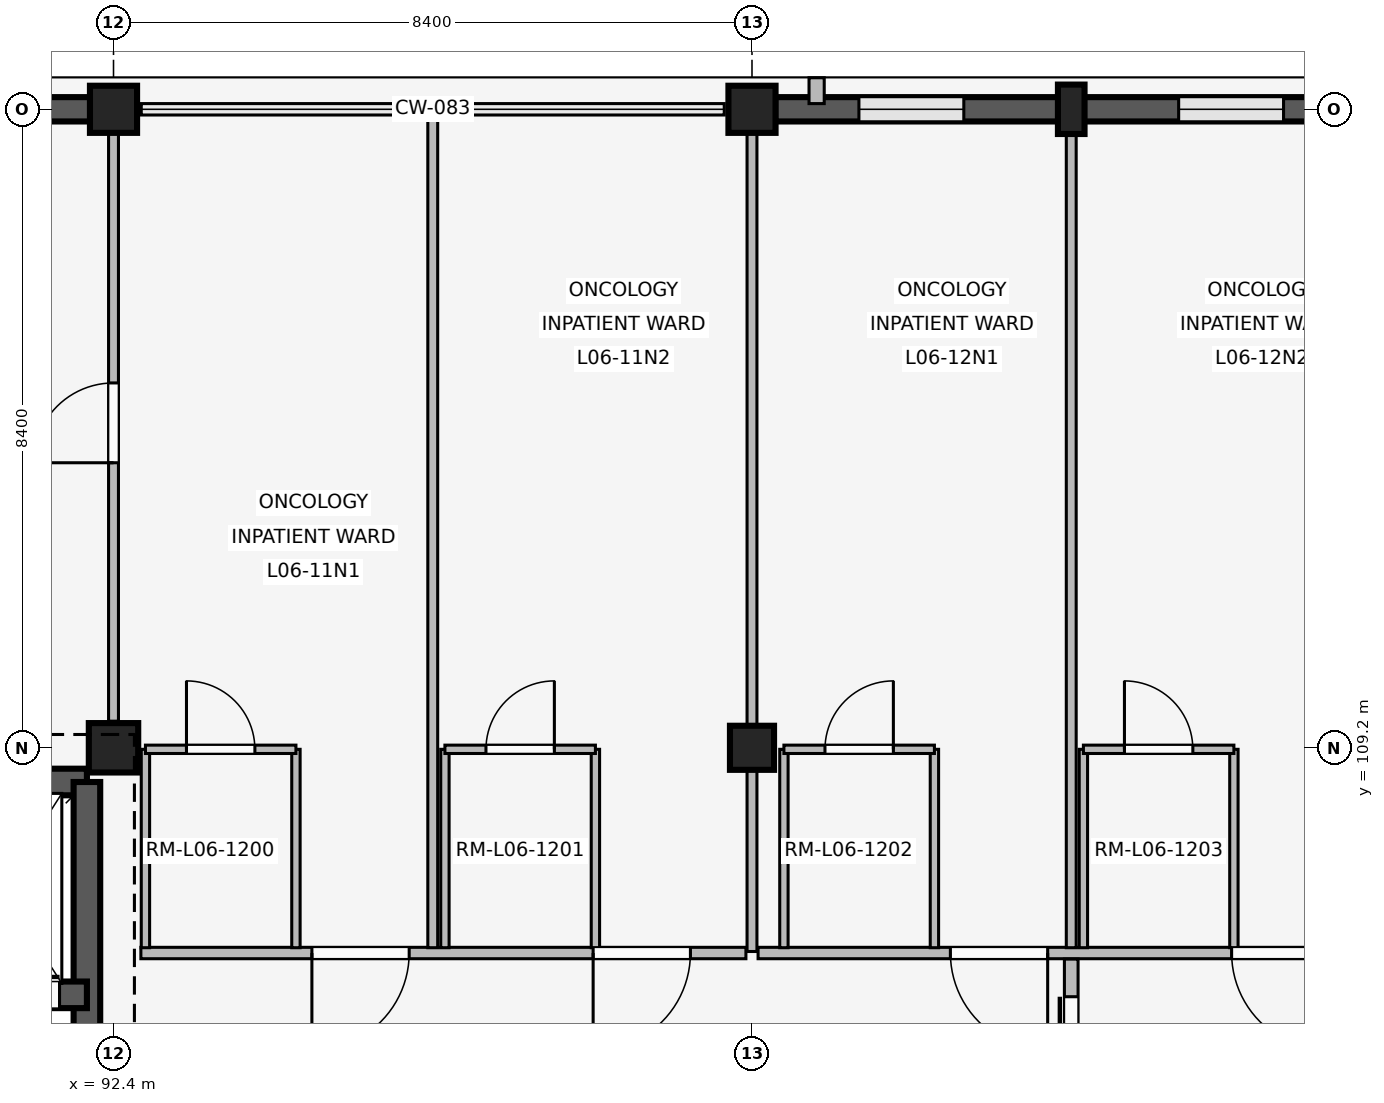
"""IFC4 building model, lengths in metres.
Left out: names, types, materials, properties, quantities, classifications, styles, units other than length and angle.
Written with IfcOpenShell. Run it as: python <this file> out.ifc"""

import sys

from ifc_helpers import new_model, si_unit, direction, frame, frame_2d, origin, origin_2d, place, context, subcontext, project, spatial, rectangle, extrude, element, fill, save


model = new_model("IFC4")
c1 = context("Model", 3, precision=1e-05, world=origin(), true_north=direction((0.0, 1.0)))
c2 = subcontext(c1, "Body", "Model", "MODEL_VIEW")
j1 = project(units=[si_unit("LENGTHUNIT", "METRE"), si_unit("PLANEANGLEUNIT", "RADIAN")], contexts=[c1])
p1 = place(None, origin())
s1 = spatial("IfcSite", under=j1, at=p1, CompositionType="ELEMENT")
p2 = place(p1, origin())
s2 = spatial("IfcBuilding", under=s1, at=p2, CompositionType="ELEMENT")
p3 = place(p2, frame((0.0, 0.0, 24.6)))
s3 = spatial("IfcBuildingStorey", under=s2, at=p3, CompositionType="ELEMENT", Elevation=24.6)
p4 = place(p3, frame((92.4, 109.2, 0.0), z_axis=(0.0, 0.0, 1.0), x_axis=(1.0, 0.0, 0.0)))
e1 = element("IfcColumn", 1, at=p4, inside=s3, PredefinedType="COLUMN", context=c2, shape_type="SweptSolid", body=[
    extrude(rectangle(XDim=0.65, YDim=0.65, at=origin_2d()), origin(), (0.0, 0.0, 1.0), 4.2),
])
p5 = place(p3, frame((92.4, 117.6, 0.0), z_axis=(0.0, 0.0, 1.0), x_axis=(1.0, 0.0, 0.0)))
e2 = element("IfcColumn", 2, at=p5, inside=s3, PredefinedType="COLUMN", context=c2, shape_type="SweptSolid", body=[
    extrude(rectangle(XDim=0.62, YDim=0.62, at=origin_2d()), origin(), (0.0, 0.0, 1.0), 4.2),
])
p6 = place(p3, frame((100.8, 109.2, 0.0), z_axis=(0.0, 0.0, 1.0), x_axis=(1.0, 0.0, 0.0)))
e3 = element("IfcColumn", 3, at=p6, inside=s3, PredefinedType="COLUMN", context=c2, shape_type="SweptSolid", body=[
    extrude(rectangle(XDim=0.58, YDim=0.58, at=origin_2d()), origin(), (0.0, 0.0, 1.0), 4.2),
])
p7 = place(p3, frame((100.8, 117.6, 0.0), z_axis=(0.0, 0.0, 1.0), x_axis=(1.0, 0.0, 0.0)))
e4 = element("IfcColumn", 4, at=p7, inside=s3, PredefinedType="COLUMN", context=c2, shape_type="SweptSolid", body=[
    extrude(rectangle(XDim=0.62, YDim=0.62, at=origin_2d()), origin(), (0.0, 0.0, 1.0), 4.2),
])
p8 = place(p3, frame((105.0, 117.6, 0.0), z_axis=(0.0, 0.0, 1.0), x_axis=(1.0, 0.0, 0.0)))
e5 = element("IfcColumn", 5, at=p8, inside=s3, PredefinedType="PILASTER", context=c2, shape_type="SweptSolid", body=[
    extrude(rectangle(XDim=0.35, YDim=0.65, at=origin_2d()), origin(), (0.0, 0.0, 1.0), 4.2),
])
p9 = place(p3, frame((84.305, 117.6, 0.0), z_axis=(0.0, 0.0, 1.0), x_axis=(1.0, 0.0, 0.0)))
e6 = element("IfcWall", 6, at=p9, inside=s3, PredefinedType="SOLIDWALL", context=c2, shape_type="SweptSolid", body=[
    extrude(rectangle(XDim=7.79, YDim=0.32, at=frame_2d((3.895, 0.0))), origin(), (0.0, 0.0, 1.0), 3.34),
])
p10 = place(p9, frame((1.022, 0.0, 0.85)))
e7 = element("IfcOpeningElement", 7, at=p10, cuts=e6, PredefinedType="OPENING", context=c2, shape_type="SweptSolid", body=[
    extrude(rectangle(XDim=1.54, YDim=1.85, at=frame_2d((0.77, 0.925))), frame((0.0, 0.17, 0.0), z_axis=(0.0, -1.0, 0.0), x_axis=(1.0, 0.0, 0.0)), (0.0, 0.0, 1.0), 0.34),
])
p11 = place(p9, frame((5.228, 0.0, 0.85)))
e8 = element("IfcOpeningElement", 8, at=p11, cuts=e6, PredefinedType="OPENING", context=c2, shape_type="SweptSolid", body=[
    extrude(rectangle(XDim=1.54, YDim=1.85, at=frame_2d((0.77, 0.925))), frame((0.0, 0.17, 0.0), z_axis=(0.0, -1.0, 0.0), x_axis=(1.0, 0.0, 0.0)), (0.0, 0.0, 1.0), 0.34),
])
p12 = place(p3, frame((101.105, 117.6, 0.0), z_axis=(0.0, 0.0, 1.0), x_axis=(1.0, 0.0, 0.0)))
e9 = element("IfcWall", 9, at=p12, inside=s3, PredefinedType="SOLIDWALL", context=c2, shape_type="SweptSolid", body=[
    extrude(rectangle(XDim=7.79, YDim=0.32, at=frame_2d((3.895, 0.0))), origin(), (0.0, 0.0, 1.0), 3.34),
])
p13 = place(p12, frame((1.102, 0.0, 0.85)))
e10 = element("IfcOpeningElement", 10, at=p13, cuts=e9, PredefinedType="OPENING", context=c2, shape_type="SweptSolid", body=[
    extrude(rectangle(XDim=1.38, YDim=1.5, at=frame_2d((0.69, 0.75))), frame((0.0, 0.17, 0.0), z_axis=(0.0, -1.0, 0.0), x_axis=(1.0, 0.0, 0.0)), (0.0, 0.0, 1.0), 0.34),
])
p14 = place(p12, frame((5.308, 0.0, 0.85)))
e11 = element("IfcOpeningElement", 11, at=p14, cuts=e9, PredefinedType="OPENING", context=c2, shape_type="SweptSolid", body=[
    extrude(rectangle(XDim=1.38, YDim=1.5, at=frame_2d((0.69, 0.75))), frame((0.0, 0.17, 0.0), z_axis=(0.0, -1.0, 0.0), x_axis=(1.0, 0.0, 0.0)), (0.0, 0.0, 1.0), 0.34),
])
p15 = place(p3, frame((101.65, 117.675, 0.0), z_axis=(0.0, 0.0, 1.0), x_axis=(0.0, 1.0, 0.0)))
e12 = element("IfcWall", 12, at=p15, inside=s3, PredefinedType="ELEMENTEDWALL", context=c2, shape_type="SweptSolid", body=[
    extrude(rectangle(XDim=0.34, YDim=0.2, at=frame_2d((0.17, 0.0))), origin(), (0.0, 0.0, 1.0), 3.32),
])
p16 = place(p3, frame((84.55, 108.75, 0.0), z_axis=(0.0, 0.0, 1.0), x_axis=(1.0, 0.0, 0.0)))
e13 = element("IfcWall", 13, at=p16, inside=s3, PredefinedType="SHEAR", context=c2, shape_type="SweptSolid", body=[
    extrude(rectangle(XDim=7.5, YDim=0.35, at=frame_2d((3.75, 0.0))), origin(), (0.0, 0.0, 1.0), 3.92),
])
p17 = place(p3, frame((92.05, 101.2, 0.0), z_axis=(0.0, 0.0, 1.0), x_axis=(0.0, 1.0, 0.0)))
e14 = element("IfcWall", 14, at=p17, inside=s3, PredefinedType="SHEAR", context=c2, shape_type="SweptSolid", body=[
    extrude(rectangle(XDim=7.55, YDim=0.35, at=frame_2d((3.775, 0.0))), origin(), (0.0, 0.0, 1.0), 3.92),
])
p18 = place(p17, frame((2.4, 0.0, 0.0)))
e15 = element("IfcOpeningElement", 15, at=p18, cuts=e14, PredefinedType="OPENING", context=c2, shape_type="SweptSolid", body=[
    extrude(rectangle(XDim=1.2, YDim=2.2, at=frame_2d((0.6, 1.1))), frame((0.0, 0.185, 0.0), z_axis=(0.0, -1.0, 0.0), x_axis=(1.0, 0.0, 0.0)), (0.0, 0.0, 1.0), 0.37),
])
p19 = place(p3, frame((88.25, 105.95, 0.0), z_axis=(0.0, 0.0, 1.0), x_axis=(1.0, 0.0, 0.0)))
e16 = element("IfcWall", 16, at=p19, inside=s3, PredefinedType="SHEAR", context=c2, shape_type="SweptSolid", body=[
    extrude(rectangle(XDim=3.8, YDim=0.35, at=frame_2d((1.9, 0.0))), origin(), (0.0, 0.0, 1.0), 3.92),
])
p20 = place(p19, frame((0.32, 0.0, 0.0)))
e17 = element("IfcOpeningElement", 17, at=p20, cuts=e16, PredefinedType="OPENING", context=c2, shape_type="SweptSolid", body=[
    extrude(rectangle(XDim=1.35, YDim=2.25, at=frame_2d((0.675, 1.125))), frame((0.0, 0.185, 0.0), z_axis=(0.0, -1.0, 0.0), x_axis=(1.0, 0.0, 0.0)), (0.0, 0.0, 1.0), 0.37),
])
p21 = place(p19, frame((2.04, 0.0, 0.0)))
e18 = element("IfcOpeningElement", 18, at=p21, cuts=e16, PredefinedType="OPENING", context=c2, shape_type="SweptSolid", body=[
    extrude(rectangle(XDim=1.4, YDim=2.25, at=frame_2d((0.7, 1.125))), frame((0.0, 0.185, 0.0), z_axis=(0.0, -1.0, 0.0), x_axis=(1.0, 0.0, 0.0)), (0.0, 0.0, 1.0), 0.37),
])
p22 = place(p3, frame((92.4, 109.55, 0.0), z_axis=(0.0, 0.0, 1.0), x_axis=(0.0, 1.0, 0.0)))
e19 = element("IfcWall", 19, at=p22, inside=s3, PredefinedType="PARTITIONING", context=c2, shape_type="SweptSolid", body=[
    extrude(rectangle(XDim=7.91, YDim=0.13, at=frame_2d((3.955, 0.0))), origin(), (0.0, 0.0, 1.0), 3.32),
])
p23 = place(p22, frame((3.4, 0.0, 0.0)))
e20 = element("IfcOpeningElement", 20, at=p23, cuts=e19, PredefinedType="OPENING", context=c2, shape_type="SweptSolid", body=[
    extrude(rectangle(XDim=1.05, YDim=2.2, at=frame_2d((0.525, 1.1))), frame((0.0, 0.075, 0.0), z_axis=(0.0, -1.0, 0.0), x_axis=(1.0, 0.0, 0.0)), (0.0, 0.0, 1.0), 0.15),
])
p24 = place(p3, frame((100.72, 106.5, 0.0), z_axis=(0.0, 0.0, 1.0), x_axis=(-1.0, 0.0, 0.0)))
e21 = element("IfcWall", 21, at=p24, inside=s3, PredefinedType="PARTITIONING", context=c2, shape_type="SweptSolid", body=[
    extrude(rectangle(XDim=7.96, YDim=0.15, at=frame_2d((3.98, 0.0))), origin(), (0.0, 0.0, 1.0), 3.32),
])
p25 = place(p24, frame((0.73, 0.0, 0.0)))
e22 = element("IfcOpeningElement", 22, at=p25, cuts=e21, PredefinedType="OPENING", context=c2, shape_type="SweptSolid", body=[
    extrude(rectangle(XDim=1.28, YDim=2.2, at=frame_2d((0.64, 1.1))), frame((0.0, 0.085, 0.0), z_axis=(0.0, -1.0, 0.0), x_axis=(1.0, 0.0, 0.0)), (0.0, 0.0, 1.0), 0.17),
])
p26 = place(p24, frame((4.43, 0.0, 0.0)))
e23 = element("IfcOpeningElement", 23, at=p26, cuts=e21, PredefinedType="OPENING", context=c2, shape_type="SweptSolid", body=[
    extrude(rectangle(XDim=1.28, YDim=2.2, at=frame_2d((0.64, 1.1))), frame((0.0, 0.085, 0.0), z_axis=(0.0, -1.0, 0.0), x_axis=(1.0, 0.0, 0.0)), (0.0, 0.0, 1.0), 0.17),
])
p27 = place(p3, frame((96.6, 106.57, 0.0), z_axis=(0.0, 0.0, 1.0), x_axis=(0.0, 1.0, 0.0)))
e24 = element("IfcWall", 24, at=p27, inside=s3, PredefinedType="PARTITIONING", context=c2, shape_type="SweptSolid", body=[
    extrude(rectangle(XDim=10.93, YDim=0.13, at=frame_2d((5.465, 0.0))), origin(), (0.0, 0.0, 1.0), 3.32),
])
for number, where, z_axis, x_axis in (
    (25, (92.82, 106.57, 0.0), (0.0, 0.0, 1.0), (0.0, 1.0, 0.0)),
    (26, (94.8, 106.57, 0.0), (0.0, 0.0, 1.0), (0.0, 1.0, 0.0)),
):
    element("IfcWall", number, at=place(p3, frame(where, z_axis=z_axis, x_axis=x_axis)), inside=s3, PredefinedType="PARTITIONING", context=c2, shape_type="SweptSolid", body=[
        extrude(rectangle(XDim=2.61, YDim=0.11, at=frame_2d((1.305, 0.0))), origin(), (0.0, 0.0, 1.0), 3.32),
    ])
p28 = place(p3, frame((92.82, 109.18, 0.0), z_axis=(0.0, 0.0, 1.0), x_axis=(1.0, 0.0, 0.0)))
e27 = element("IfcWall", 27, at=p28, inside=s3, PredefinedType="PARTITIONING", context=c2, shape_type="SweptSolid", body=[
    extrude(rectangle(XDim=1.98, YDim=0.11, at=frame_2d((0.99, 0.0))), origin(), (0.0, 0.0, 1.0), 3.32),
])
p29 = place(p28, frame((0.54, 0.0, 0.0)))
e28 = element("IfcOpeningElement", 28, at=p29, cuts=e27, PredefinedType="OPENING", context=c2, shape_type="SweptSolid", body=[
    extrude(rectangle(XDim=0.9, YDim=2.1, at=frame_2d((0.45, 1.05))), frame((0.0, 0.065, 0.0), z_axis=(0.0, -1.0, 0.0), x_axis=(1.0, 0.0, 0.0)), (0.0, 0.0, 1.0), 0.13),
])
for number, where, z_axis, x_axis in (
    (29, (96.76, 106.57, 0.0), (0.0, 0.0, 1.0), (0.0, 1.0, 0.0)),
    (30, (98.74, 106.57, 0.0), (0.0, 0.0, 1.0), (0.0, 1.0, 0.0)),
):
    element("IfcWall", number, at=place(p3, frame(where, z_axis=z_axis, x_axis=x_axis)), inside=s3, PredefinedType="PARTITIONING", context=c2, shape_type="SweptSolid", body=[
        extrude(rectangle(XDim=2.61, YDim=0.11, at=frame_2d((1.305, 0.0))), origin(), (0.0, 0.0, 1.0), 3.32),
    ])
p30 = place(p3, frame((96.76, 109.18, 0.0), z_axis=(0.0, 0.0, 1.0), x_axis=(1.0, 0.0, 0.0)))
e31 = element("IfcWall", 31, at=p30, inside=s3, PredefinedType="PARTITIONING", context=c2, shape_type="SweptSolid", body=[
    extrude(rectangle(XDim=1.98, YDim=0.11, at=frame_2d((0.99, 0.0))), origin(), (0.0, 0.0, 1.0), 3.32),
])
p31 = place(p30, frame((0.54, 0.0, 0.0)))
e32 = element("IfcOpeningElement", 32, at=p31, cuts=e31, PredefinedType="OPENING", context=c2, shape_type="SweptSolid", body=[
    extrude(rectangle(XDim=0.9, YDim=2.1, at=frame_2d((0.45, 1.05))), frame((0.0, 0.065, 0.0), z_axis=(0.0, -1.0, 0.0), x_axis=(1.0, 0.0, 0.0)), (0.0, 0.0, 1.0), 0.13),
])
p32 = place(p3, frame((100.8, 106.52, 0.0), z_axis=(0.0, 0.0, 1.0), x_axis=(0.0, 1.0, 0.0)))
e33 = element("IfcWall", 33, at=p32, inside=s3, PredefinedType="PARTITIONING", context=c2, shape_type="SweptSolid", body=[
    extrude(rectangle(XDim=10.94, YDim=0.13, at=frame_2d((5.47, 0.0))), origin(), (0.0, 0.0, 1.0), 3.32),
])
p33 = place(p3, frame((109.12, 106.5, 0.0), z_axis=(0.0, 0.0, 1.0), x_axis=(-1.0, 0.0, 0.0)))
e34 = element("IfcWall", 34, at=p33, inside=s3, PredefinedType="PARTITIONING", context=c2, shape_type="SweptSolid", body=[
    extrude(rectangle(XDim=8.24, YDim=0.15, at=frame_2d((4.12, 0.0))), origin(), (0.0, 0.0, 1.0), 3.32),
])
p34 = place(p33, frame((0.73, 0.0, 0.0)))
e35 = element("IfcOpeningElement", 35, at=p34, cuts=e34, PredefinedType="OPENING", context=c2, shape_type="SweptSolid", body=[
    extrude(rectangle(XDim=1.28, YDim=2.2, at=frame_2d((0.64, 1.1))), frame((0.0, 0.085, 0.0), z_axis=(0.0, -1.0, 0.0), x_axis=(1.0, 0.0, 0.0)), (0.0, 0.0, 1.0), 0.17),
])
p35 = place(p33, frame((4.43, 0.0, 0.0)))
e36 = element("IfcOpeningElement", 36, at=p35, cuts=e34, PredefinedType="OPENING", context=c2, shape_type="SweptSolid", body=[
    extrude(rectangle(XDim=1.28, YDim=2.2, at=frame_2d((0.64, 1.1))), frame((0.0, 0.085, 0.0), z_axis=(0.0, -1.0, 0.0), x_axis=(1.0, 0.0, 0.0)), (0.0, 0.0, 1.0), 0.17),
])
p36 = place(p3, frame((105.0, 106.57, 0.0), z_axis=(0.0, 0.0, 1.0), x_axis=(0.0, 1.0, 0.0)))
e37 = element("IfcWall", 37, at=p36, inside=s3, PredefinedType="PARTITIONING", context=c2, shape_type="SweptSolid", body=[
    extrude(rectangle(XDim=10.93, YDim=0.13, at=frame_2d((5.465, 0.0))), origin(), (0.0, 0.0, 1.0), 3.32),
])
for number, where, z_axis, x_axis in (
    (38, (101.22, 106.57, 0.0), (0.0, 0.0, 1.0), (0.0, 1.0, 0.0)),
    (39, (103.2, 106.57, 0.0), (0.0, 0.0, 1.0), (0.0, 1.0, 0.0)),
):
    element("IfcWall", number, at=place(p3, frame(where, z_axis=z_axis, x_axis=x_axis)), inside=s3, PredefinedType="PARTITIONING", context=c2, shape_type="SweptSolid", body=[
        extrude(rectangle(XDim=2.61, YDim=0.11, at=frame_2d((1.305, 0.0))), origin(), (0.0, 0.0, 1.0), 3.32),
    ])
p37 = place(p3, frame((101.22, 109.18, 0.0), z_axis=(0.0, 0.0, 1.0), x_axis=(1.0, 0.0, 0.0)))
e40 = element("IfcWall", 40, at=p37, inside=s3, PredefinedType="PARTITIONING", context=c2, shape_type="SweptSolid", body=[
    extrude(rectangle(XDim=1.98, YDim=0.11, at=frame_2d((0.99, 0.0))), origin(), (0.0, 0.0, 1.0), 3.32),
])
p38 = place(p37, frame((0.54, 0.0, 0.0)))
e41 = element("IfcOpeningElement", 41, at=p38, cuts=e40, PredefinedType="OPENING", context=c2, shape_type="SweptSolid", body=[
    extrude(rectangle(XDim=0.9, YDim=2.1, at=frame_2d((0.45, 1.05))), frame((0.0, 0.065, 0.0), z_axis=(0.0, -1.0, 0.0), x_axis=(1.0, 0.0, 0.0)), (0.0, 0.0, 1.0), 0.13),
])
for number, where, z_axis, x_axis in (
    (42, (105.16, 106.57, 0.0), (0.0, 0.0, 1.0), (0.0, 1.0, 0.0)),
    (43, (107.14, 106.57, 0.0), (0.0, 0.0, 1.0), (0.0, 1.0, 0.0)),
):
    element("IfcWall", number, at=place(p3, frame(where, z_axis=z_axis, x_axis=x_axis)), inside=s3, PredefinedType="PARTITIONING", context=c2, shape_type="SweptSolid", body=[
        extrude(rectangle(XDim=2.61, YDim=0.11, at=frame_2d((1.305, 0.0))), origin(), (0.0, 0.0, 1.0), 3.32),
    ])
p39 = place(p3, frame((105.16, 109.18, 0.0), z_axis=(0.0, 0.0, 1.0), x_axis=(1.0, 0.0, 0.0)))
e44 = element("IfcWall", 44, at=p39, inside=s3, PredefinedType="PARTITIONING", context=c2, shape_type="SweptSolid", body=[
    extrude(rectangle(XDim=1.98, YDim=0.11, at=frame_2d((0.99, 0.0))), origin(), (0.0, 0.0, 1.0), 3.32),
])
p40 = place(p39, frame((0.54, 0.0, 0.0)))
e45 = element("IfcOpeningElement", 45, at=p40, cuts=e44, PredefinedType="OPENING", context=c2, shape_type="SweptSolid", body=[
    extrude(rectangle(XDim=0.9, YDim=2.1, at=frame_2d((0.45, 1.05))), frame((0.0, 0.065, 0.0), z_axis=(0.0, -1.0, 0.0), x_axis=(1.0, 0.0, 0.0)), (0.0, 0.0, 1.0), 0.13),
])
p41 = place(p3, frame((105.0, 103.58, 0.0), z_axis=(0.0, 0.0, 1.0), x_axis=(0.0, 1.0, 0.0)))
e46 = element("IfcWall", 46, at=p41, inside=s3, PredefinedType="PARTITIONING", context=c2, shape_type="SweptSolid", body=[
    extrude(rectangle(XDim=2.84, YDim=0.18, at=frame_2d((1.42, 0.0))), origin(), (0.0, 0.0, 1.0), 3.32),
])
p42 = place(p41, frame((0.495, 0.0, 0.0)))
e47 = element("IfcOpeningElement", 47, at=p42, cuts=e46, PredefinedType="OPENING", context=c2, shape_type="SweptSolid", body=[
    extrude(rectangle(XDim=1.85, YDim=2.3, at=frame_2d((0.925, 1.15))), frame((0.0, 0.1, 0.0), z_axis=(0.0, -1.0, 0.0), x_axis=(1.0, 0.0, 0.0)), (0.0, 0.0, 1.0), 0.2),
])
p43 = place(p13, origin())
e48 = element("IfcWindow", 48, at=p43, inside=s3, PartitioningType="SINGLE_PANEL", PredefinedType="WINDOW", context=c2, shape_type="SweptSolid", body=[
    extrude(rectangle(XDim=1.38, YDim=1.5, at=frame_2d((0.69, 0.75))), frame((0.0, 0.03, 0.0), z_axis=(0.0, -1.0, 0.0), x_axis=(1.0, 0.0, 0.0)), (0.0, 0.0, 1.0), 0.06),
])
fill(e10, e48)
p44 = place(p14, origin())
e49 = element("IfcWindow", 49, at=p44, inside=s3, PartitioningType="SINGLE_PANEL", PredefinedType="WINDOW", context=c2, shape_type="SweptSolid", body=[
    extrude(rectangle(XDim=1.38, YDim=1.5, at=frame_2d((0.69, 0.75))), frame((0.0, 0.03, 0.0), z_axis=(0.0, -1.0, 0.0), x_axis=(1.0, 0.0, 0.0)), (0.0, 0.0, 1.0), 0.06),
])
fill(e11, e49)
p45 = place(p21, origin())
e50 = element("IfcDoor", 50, at=p45, inside=s3, OperationType="SLIDING_TO_LEFT", PredefinedType="DOOR", context=c2, shape_type="SweptSolid", body=[
    extrude(rectangle(XDim=1.4, YDim=2.25, at=frame_2d((0.7, 1.125))), frame((0.0, 0.025, 0.0), z_axis=(0.0, -1.0, 0.0), x_axis=(1.0, 0.0, 0.0)), (0.0, 0.0, 1.0), 0.05),
])
fill(e18, e50)
p46 = place(p23, origin())
e51 = element("IfcDoor", 51, at=p46, inside=s3, OperationType="SINGLE_SWING_LEFT", PredefinedType="DOOR", context=c2, shape_type="SweptSolid", body=[
    extrude(rectangle(XDim=1.05, YDim=2.2, at=frame_2d((0.525, 1.1))), frame((0.0, 0.025, 0.0), z_axis=(0.0, -1.0, 0.0), x_axis=(1.0, 0.0, 0.0)), (0.0, 0.0, 1.0), 0.05),
])
fill(e20, e51)
p47 = place(p25, origin())
e52 = element("IfcDoor", 52, at=p47, inside=s3, OperationType="SINGLE_SWING_RIGHT", PredefinedType="DOOR", context=c2, shape_type="SweptSolid", body=[
    extrude(rectangle(XDim=1.28, YDim=2.2, at=frame_2d((0.64, 1.1))), frame((0.0, 0.025, 0.0), z_axis=(0.0, -1.0, 0.0), x_axis=(1.0, 0.0, 0.0)), (0.0, 0.0, 1.0), 0.05),
])
fill(e22, e52)
p48 = place(p26, origin())
e53 = element("IfcDoor", 53, at=p48, inside=s3, OperationType="SINGLE_SWING_RIGHT", PredefinedType="DOOR", context=c2, shape_type="SweptSolid", body=[
    extrude(rectangle(XDim=1.28, YDim=2.2, at=frame_2d((0.64, 1.1))), frame((0.0, 0.025, 0.0), z_axis=(0.0, -1.0, 0.0), x_axis=(1.0, 0.0, 0.0)), (0.0, 0.0, 1.0), 0.05),
])
fill(e23, e53)
p49 = place(p29, origin())
e54 = element("IfcDoor", 54, at=p49, inside=s3, OperationType="SINGLE_SWING_LEFT", PredefinedType="DOOR", context=c2, shape_type="SweptSolid", body=[
    extrude(rectangle(XDim=0.9, YDim=2.1, at=frame_2d((0.45, 1.05))), frame((0.0, 0.025, 0.0), z_axis=(0.0, -1.0, 0.0), x_axis=(1.0, 0.0, 0.0)), (0.0, 0.0, 1.0), 0.05),
])
fill(e28, e54)
p50 = place(p31, origin())
e55 = element("IfcDoor", 55, at=p50, inside=s3, OperationType="SINGLE_SWING_RIGHT", PredefinedType="DOOR", context=c2, shape_type="SweptSolid", body=[
    extrude(rectangle(XDim=0.9, YDim=2.1, at=frame_2d((0.45, 1.05))), frame((0.0, 0.025, 0.0), z_axis=(0.0, -1.0, 0.0), x_axis=(1.0, 0.0, 0.0)), (0.0, 0.0, 1.0), 0.05),
])
fill(e32, e55)
p51 = place(p34, origin())
e56 = element("IfcDoor", 56, at=p51, inside=s3, OperationType="SINGLE_SWING_LEFT", PredefinedType="DOOR", context=c2, shape_type="SweptSolid", body=[
    extrude(rectangle(XDim=1.28, YDim=2.2, at=frame_2d((0.64, 1.1))), frame((0.0, 0.025, 0.0), z_axis=(0.0, -1.0, 0.0), x_axis=(1.0, 0.0, 0.0)), (0.0, 0.0, 1.0), 0.05),
])
fill(e35, e56)
p52 = place(p35, origin())
e57 = element("IfcDoor", 57, at=p52, inside=s3, OperationType="SINGLE_SWING_LEFT", PredefinedType="DOOR", context=c2, shape_type="SweptSolid", body=[
    extrude(rectangle(XDim=1.28, YDim=2.2, at=frame_2d((0.64, 1.1))), frame((0.0, 0.025, 0.0), z_axis=(0.0, -1.0, 0.0), x_axis=(1.0, 0.0, 0.0)), (0.0, 0.0, 1.0), 0.05),
])
fill(e36, e57)
p53 = place(p38, origin())
e58 = element("IfcDoor", 58, at=p53, inside=s3, OperationType="SINGLE_SWING_RIGHT", PredefinedType="DOOR", context=c2, shape_type="SweptSolid", body=[
    extrude(rectangle(XDim=0.9, YDim=2.1, at=frame_2d((0.45, 1.05))), frame((0.0, 0.025, 0.0), z_axis=(0.0, -1.0, 0.0), x_axis=(1.0, 0.0, 0.0)), (0.0, 0.0, 1.0), 0.05),
])
fill(e41, e58)
p54 = place(p40, origin())
e59 = element("IfcDoor", 59, at=p54, inside=s3, OperationType="SINGLE_SWING_LEFT", PredefinedType="DOOR", context=c2, shape_type="SweptSolid", body=[
    extrude(rectangle(XDim=0.9, YDim=2.1, at=frame_2d((0.45, 1.05))), frame((0.0, 0.025, 0.0), z_axis=(0.0, -1.0, 0.0), x_axis=(1.0, 0.0, 0.0)), (0.0, 0.0, 1.0), 0.05),
])
fill(e45, e59)
p55 = place(p42, origin())
e60 = element("IfcDoor", 60, at=p55, inside=s3, OperationType="SLIDING_TO_LEFT", PredefinedType="DOOR", context=c2, shape_type="SweptSolid", body=[
    extrude(rectangle(XDim=1.85, YDim=2.3, at=frame_2d((0.925, 1.15))), frame((0.0, 0.025, 0.0), z_axis=(0.0, -1.0, 0.0), x_axis=(1.0, 0.0, 0.0)), (0.0, 0.0, 1.0), 0.05),
])
fill(e47, e60)
save(model, sys.argv[1])
